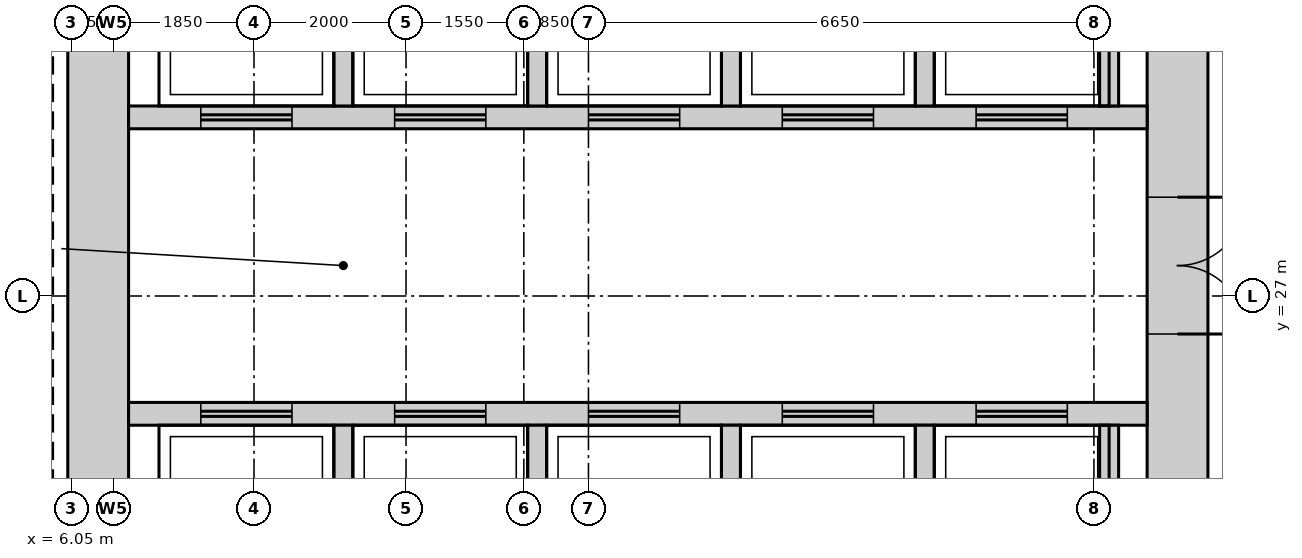
"""IFC4 building model, lengths in metres.
Left out: names, types, materials, properties, quantities, classifications, styles, units other than length and angle.
Written with IfcOpenShell. Run it as: python <this file> out.ifc"""

import sys

from ifc_helpers import new_model, si_unit, direction, frame, frame_2d, origin, place, context, subcontext, project, spatial, rectangle, extrude, source, transform, mapped, element, fill, save


model = new_model("IFC4")
c1 = context("Model", 3, precision=1e-05, world=origin(), true_north=direction((0.0, 1.0)))
c2 = subcontext(c1, "Body", "Model", "MODEL_VIEW")
j1 = project(units=[si_unit("LENGTHUNIT", "METRE"), si_unit("PLANEANGLEUNIT", "RADIAN")], contexts=[c1])
p1 = place(None, origin())
s1 = spatial("IfcSite", under=j1, at=p1, CompositionType="ELEMENT")
p2 = place(p1, origin())
s2 = spatial("IfcBuilding", under=s1, at=p2, CompositionType="ELEMENT")
p3 = place(p2, frame((0.0, 0.0, 212.7)))
s3 = spatial("IfcBuildingStorey", under=s2, at=p3, CompositionType="ELEMENT", Elevation=212.7)
m1 = source(origin(), c2, "Body", "SweptSolid", [
    extrude(rectangle(XDim=22.4, YDim=0.8, at=frame_2d((11.2, 0.0))), origin(), (0.0, 0.0, 1.0), 3.75),
])
p4 = place(p3, frame((20.6, 15.8, 0.0), z_axis=(0.0, 0.0, 1.0), x_axis=(0.0, 1.0, 0.0)))
e1 = element("IfcWall", 1, at=p4, inside=s3, PredefinedType="SHEAR", context=c2, shape_type="MappedRepresentation", body=[
    mapped(m1, transform((0.0, 0.0, 0.0))),
])
m2 = source(origin(), c2, "Body", "SweptSolid", [
    extrude(rectangle(XDim=1.8, YDim=2.1, at=frame_2d((0.9, 1.05))), frame((0.0, 0.41, 0.0), z_axis=(0.0, -1.0, 0.0), x_axis=(1.0, 0.0, 0.0)), (0.0, 0.0, 1.0), 0.82),
])
p5 = place(p4, frame((10.7, 0.0, 0.0)))
e2 = element("IfcOpeningElement", 2, at=p5, cuts=e1, PredefinedType="OPENING", context=c2, shape_type="MappedRepresentation", body=[
    mapped(m2, transform((0.0, 0.0, 0.0))),
])
m3 = source(origin(), c2, "Body", "SweptSolid", [
    extrude(rectangle(XDim=0.9, YDim=2.1, at=frame_2d((0.45, 1.05))), frame((0.0, 0.41, 0.0), z_axis=(0.0, -1.0, 0.0), x_axis=(1.0, 0.0, 0.0)), (0.0, 0.0, 1.0), 0.82),
])
p6 = place(p4, frame((0.35, 0.0, 0.0)))
e3 = element("IfcOpeningElement", 3, at=p6, cuts=e1, PredefinedType="OPENING", context=c2, shape_type="MappedRepresentation", body=[
    mapped(m3, transform((0.0, 0.0, 0.0))),
])
p7 = place(p4, frame((3.9, 0.0, 0.0)))
e4 = element("IfcOpeningElement", 4, at=p7, cuts=e1, PredefinedType="OPENING", context=c2, shape_type="MappedRepresentation", body=[
    mapped(m3, transform((0.0, 0.0, 0.0))),
])
p8 = place(p3, frame((6.4, 15.8, 0.0), z_axis=(0.0, 0.0, 1.0), x_axis=(0.0, 1.0, 0.0)))
e5 = element("IfcWall", 5, at=p8, inside=s3, PredefinedType="SHEAR", context=c2, shape_type="MappedRepresentation", body=[
    mapped(m1, transform((0.0, 0.0, 0.0))),
])
m4 = source(origin(), c2, "Body", "SweptSolid", [
    extrude(rectangle(XDim=13.4, YDim=0.3, at=frame_2d((6.7, 0.0))), origin(), (0.0, 0.0, 1.0), 3.75),
])
p9 = place(p3, frame((6.8, 29.35, 0.0), z_axis=(0.0, 0.0, 1.0), x_axis=(1.0, 0.0, 0.0)))
e6 = element("IfcWall", 6, at=p9, inside=s3, PredefinedType="STANDARD", context=c2, shape_type="MappedRepresentation", body=[
    mapped(m4, transform((0.0, 0.0, 0.0))),
])
m5 = source(origin(), c2, "Body", "SweptSolid", [
    extrude(rectangle(XDim=1.2, YDim=2.1, at=frame_2d((0.6, 1.05))), frame((0.0, 0.16, 0.0), z_axis=(0.0, -1.0, 0.0), x_axis=(1.0, 0.0, 0.0)), (0.0, 0.0, 1.0), 0.32),
])
p10 = place(p9, frame((0.95, 0.0, 0.0)))
e7 = element("IfcOpeningElement", 7, at=p10, cuts=e6, PredefinedType="OPENING", context=c2, shape_type="MappedRepresentation", body=[
    mapped(m5, transform((0.0, 0.0, 0.0))),
])
p11 = place(p9, frame((3.5, 0.0, 0.0)))
e8 = element("IfcOpeningElement", 8, at=p11, cuts=e6, PredefinedType="OPENING", context=c2, shape_type="MappedRepresentation", body=[
    mapped(m5, transform((0.0, 0.0, 0.0))),
])
p12 = place(p9, frame((6.05, 0.0, 0.0)))
e9 = element("IfcOpeningElement", 9, at=p12, cuts=e6, PredefinedType="OPENING", context=c2, shape_type="MappedRepresentation", body=[
    mapped(m5, transform((0.0, 0.0, 0.0))),
])
p13 = place(p9, frame((8.6, 0.0, 0.0)))
e10 = element("IfcOpeningElement", 10, at=p13, cuts=e6, PredefinedType="OPENING", context=c2, shape_type="MappedRepresentation", body=[
    mapped(m5, transform((0.0, 0.0, 0.0))),
])
p14 = place(p9, frame((11.15, 0.0, 0.0)))
e11 = element("IfcOpeningElement", 11, at=p14, cuts=e6, PredefinedType="OPENING", context=c2, shape_type="MappedRepresentation", body=[
    mapped(m5, transform((0.0, 0.0, 0.0))),
])
p15 = place(p3, frame((6.8, 25.45, 0.0), z_axis=(0.0, 0.0, 1.0), x_axis=(1.0, 0.0, 0.0)))
e12 = element("IfcWall", 12, at=p15, inside=s3, PredefinedType="STANDARD", context=c2, shape_type="MappedRepresentation", body=[
    mapped(m4, transform((0.0, 0.0, 0.0))),
])
p16 = place(p15, frame((0.95, 0.0, 0.0)))
e13 = element("IfcOpeningElement", 13, at=p16, cuts=e12, PredefinedType="OPENING", context=c2, shape_type="MappedRepresentation", body=[
    mapped(m5, transform((0.0, 0.0, 0.0))),
])
p17 = place(p15, frame((3.5, 0.0, 0.0)))
e14 = element("IfcOpeningElement", 14, at=p17, cuts=e12, PredefinedType="OPENING", context=c2, shape_type="MappedRepresentation", body=[
    mapped(m5, transform((0.0, 0.0, 0.0))),
])
p18 = place(p15, frame((6.05, 0.0, 0.0)))
e15 = element("IfcOpeningElement", 15, at=p18, cuts=e12, PredefinedType="OPENING", context=c2, shape_type="MappedRepresentation", body=[
    mapped(m5, transform((0.0, 0.0, 0.0))),
])
p19 = place(p15, frame((8.6, 0.0, 0.0)))
e16 = element("IfcOpeningElement", 16, at=p19, cuts=e12, PredefinedType="OPENING", context=c2, shape_type="MappedRepresentation", body=[
    mapped(m5, transform((0.0, 0.0, 0.0))),
])
p20 = place(p15, frame((11.15, 0.0, 0.0)))
e17 = element("IfcOpeningElement", 17, at=p20, cuts=e12, PredefinedType="OPENING", context=c2, shape_type="MappedRepresentation", body=[
    mapped(m5, transform((0.0, 0.0, 0.0))),
])
m6 = source(origin(), c2, "Body", "SweptSolid", [
    extrude(rectangle(XDim=2.4, YDim=0.25, at=frame_2d((1.2, 0.0))), origin(), (0.0, 0.0, 1.0), 3.75),
])
for number, where, z_axis, x_axis in (
    (18, (17.275, 29.5, 0.0), (0.0, 0.0, 1.0), (0.0, 1.0, 0.0)),
    (19, (19.7, 29.5, 0.0), (0.0, 0.0, 1.0), (0.0, 1.0, 0.0)),
    (20, (9.625, 29.5, 0.0), (0.0, 0.0, 1.0), (0.0, 1.0, 0.0)),
    (21, (12.175, 29.5, 0.0), (0.0, 0.0, 1.0), (0.0, 1.0, 0.0)),
    (22, (14.725, 29.5, 0.0), (0.0, 0.0, 1.0), (0.0, 1.0, 0.0)),
):
    element("IfcWall", number, at=place(p3, frame(where, z_axis=z_axis, x_axis=x_axis)), inside=s3, PredefinedType="STANDARD", context=c2, shape_type="MappedRepresentation", body=[
        mapped(m6, transform((0.0, 0.0, 0.0))),
    ])
m7 = source(origin(), c2, "Body", "SweptSolid", [
    extrude(rectangle(XDim=2.4, YDim=0.25, at=frame_2d((1.2, 0.0))), origin(), (0.0, 0.0, 1.0), 3.75),
])
for number, where, z_axis, x_axis in (
    (23, (17.275, 22.9, 0.0), (0.0, 0.0, 1.0), (0.0, 1.0, 0.0)),
    (24, (19.7, 22.9, 0.0), (0.0, 0.0, 1.0), (0.0, 1.0, 0.0)),
    (25, (9.625, 22.9, 0.0), (0.0, 0.0, 1.0), (0.0, 1.0, 0.0)),
    (26, (12.175, 22.9, 0.0), (0.0, 0.0, 1.0), (0.0, 1.0, 0.0)),
    (27, (14.725, 22.9, 0.0), (0.0, 0.0, 1.0), (0.0, 1.0, 0.0)),
):
    element("IfcWall", number, at=place(p3, frame(where, z_axis=z_axis, x_axis=x_axis)), inside=s3, PredefinedType="STANDARD", context=c2, shape_type="MappedRepresentation", body=[
        mapped(m7, transform((0.0, 0.0, 0.0))),
    ])
m8 = source(origin(), c2, "Body", "SweptSolid", [
    extrude(rectangle(XDim=1.8, YDim=2.1, at=frame_2d((0.9, 1.05))), frame((0.0, 0.35, 0.0), z_axis=(0.0, -1.0, 0.0), x_axis=(1.0, 0.0, 0.0)), (0.0, 0.0, 1.0), 0.7),
])
p21 = place(p5, origin())
e28 = element("IfcDoor", 28, at=p21, inside=s3, OperationType="DOUBLE_DOOR_SINGLE_SWING", PredefinedType="DOOR", context=c2, shape_type="MappedRepresentation", body=[
    mapped(m8, transform((0.0, 0.0, 0.0))),
])
fill(e2, e28)
m9 = source(origin(), c2, "Body", "SweptSolid", [
    extrude(rectangle(XDim=1.2, YDim=2.1, at=frame_2d((0.6, 1.05))), frame((0.0, 0.025, 0.0), z_axis=(0.0, -1.0, 0.0), x_axis=(1.0, 0.0, 0.0)), (0.0, 0.0, 1.0), 0.05),
])
p22 = place(p16, origin())
e29 = element("IfcDoor", 29, at=p22, inside=s3, OperationType="DOUBLE_DOOR_SLIDING", PredefinedType="DOOR", context=c2, shape_type="MappedRepresentation", body=[
    mapped(m9, transform((0.0, 0.0, 0.0))),
])
fill(e13, e29)
p23 = place(p17, origin())
e30 = element("IfcDoor", 30, at=p23, inside=s3, OperationType="DOUBLE_DOOR_SLIDING", PredefinedType="DOOR", context=c2, shape_type="MappedRepresentation", body=[
    mapped(m9, transform((0.0, 0.0, 0.0))),
])
fill(e14, e30)
p24 = place(p18, origin())
e31 = element("IfcDoor", 31, at=p24, inside=s3, OperationType="DOUBLE_DOOR_SLIDING", PredefinedType="DOOR", context=c2, shape_type="MappedRepresentation", body=[
    mapped(m9, transform((0.0, 0.0, 0.0))),
])
fill(e15, e31)
p25 = place(p19, origin())
e32 = element("IfcDoor", 32, at=p25, inside=s3, OperationType="DOUBLE_DOOR_SLIDING", PredefinedType="DOOR", context=c2, shape_type="MappedRepresentation", body=[
    mapped(m9, transform((0.0, 0.0, 0.0))),
])
fill(e16, e32)
p26 = place(p20, origin())
e33 = element("IfcDoor", 33, at=p26, inside=s3, OperationType="DOUBLE_DOOR_SLIDING", PredefinedType="DOOR", context=c2, shape_type="MappedRepresentation", body=[
    mapped(m9, transform((0.0, 0.0, 0.0))),
])
fill(e17, e33)
p27 = place(p10, origin())
e34 = element("IfcDoor", 34, at=p27, inside=s3, OperationType="DOUBLE_DOOR_SLIDING", PredefinedType="DOOR", context=c2, shape_type="MappedRepresentation", body=[
    mapped(m9, transform((0.0, 0.0, 0.0))),
])
fill(e7, e34)
p28 = place(p11, origin())
e35 = element("IfcDoor", 35, at=p28, inside=s3, OperationType="DOUBLE_DOOR_SLIDING", PredefinedType="DOOR", context=c2, shape_type="MappedRepresentation", body=[
    mapped(m9, transform((0.0, 0.0, 0.0))),
])
fill(e8, e35)
p29 = place(p12, origin())
e36 = element("IfcDoor", 36, at=p29, inside=s3, OperationType="DOUBLE_DOOR_SLIDING", PredefinedType="DOOR", context=c2, shape_type="MappedRepresentation", body=[
    mapped(m9, transform((0.0, 0.0, 0.0))),
])
fill(e9, e36)
p30 = place(p13, origin())
e37 = element("IfcDoor", 37, at=p30, inside=s3, OperationType="DOUBLE_DOOR_SLIDING", PredefinedType="DOOR", context=c2, shape_type="MappedRepresentation", body=[
    mapped(m9, transform((0.0, 0.0, 0.0))),
])
fill(e10, e37)
p31 = place(p14, origin())
e38 = element("IfcDoor", 38, at=p31, inside=s3, OperationType="DOUBLE_DOOR_SLIDING", PredefinedType="DOOR", context=c2, shape_type="MappedRepresentation", body=[
    mapped(m9, transform((0.0, 0.0, 0.0))),
])
fill(e11, e38)
save(model, sys.argv[1])
